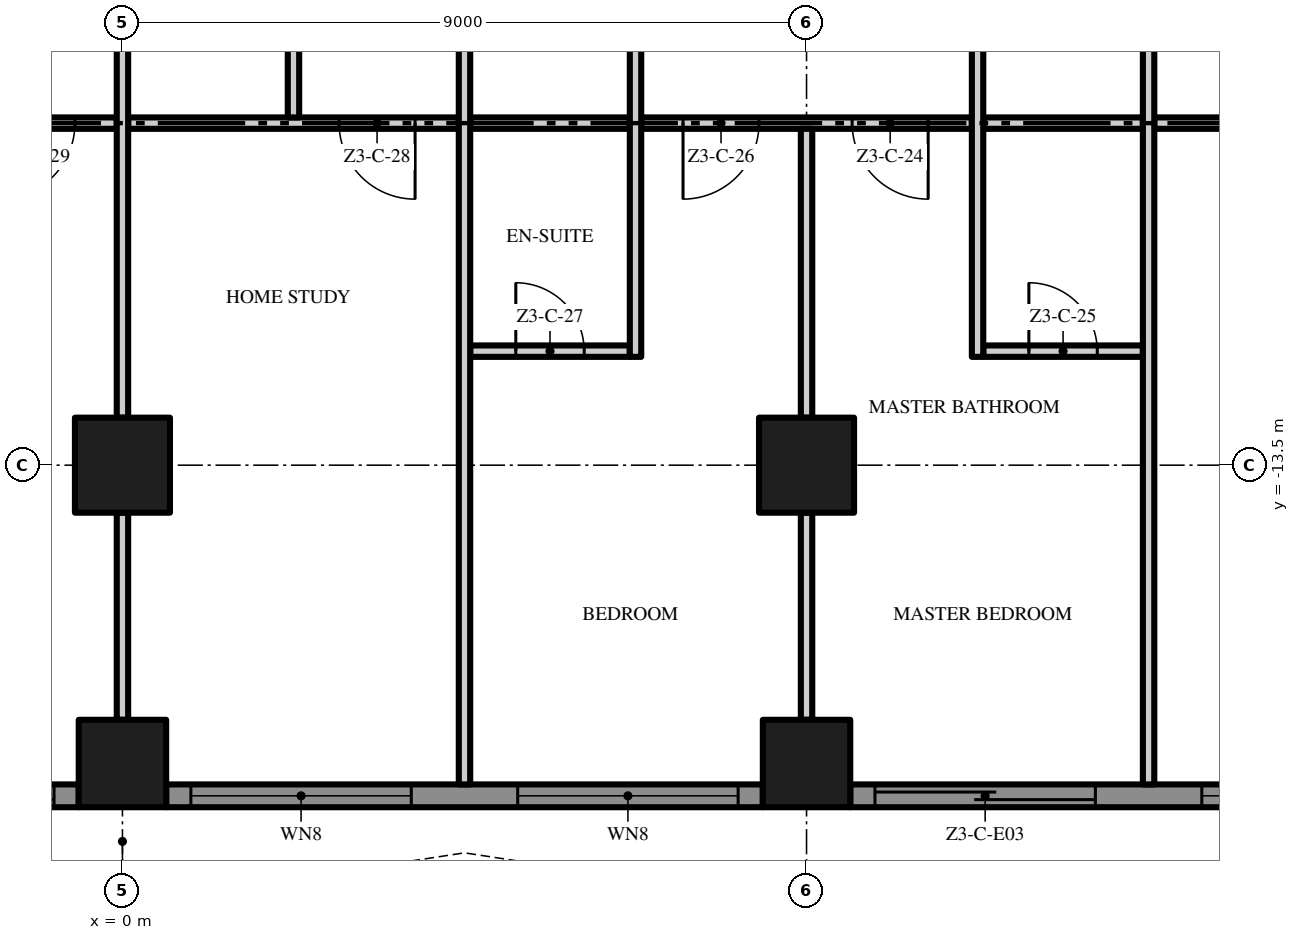
"""IFC4 building model, lengths in metres.
Left out: names, types, materials, properties, quantities, classifications, styles, units other than length and angle.
Written with IfcOpenShell. Run it as: python <this file> out.ifc"""

import sys

from ifc_helpers import new_model, si_unit, direction, frame, frame_2d, origin, origin_2d, place, context, subcontext, project, spatial, polyline, rectangle, outline, extrude, element, fill, save


model = new_model("IFC4")
c1 = context("Model", 3, precision=1e-05, world=origin(), true_north=direction((0.0, 1.0)))
c2 = subcontext(c1, "Body", "Model", "MODEL_VIEW")
j1 = project(units=[si_unit("LENGTHUNIT", "METRE"), si_unit("PLANEANGLEUNIT", "RADIAN")], contexts=[c1])
p1 = place(None, origin())
s1 = spatial("IfcSite", under=j1, at=p1, CompositionType="ELEMENT")
p2 = place(p1, origin())
s2 = spatial("IfcBuilding", under=s1, at=p2, CompositionType="ELEMENT")
p3 = place(p2, frame((0.0, 0.0, 151.6)))
s3 = spatial("IfcBuildingStorey", under=s2, at=p3, CompositionType="ELEMENT", Elevation=151.6)
p4 = place(p3, frame((0.0, -13.5, 0.0), z_axis=(0.0, 0.0, 1.0), x_axis=(1.0, 0.0, 0.0)))
e1 = element("IfcColumn", 1, at=p4, inside=s3, PredefinedType="COLUMN", context=c2, shape_type="SweptSolid", body=[
    extrude(rectangle(XDim=1.25, YDim=1.25, at=origin_2d()), origin(), (0.0, 0.0, 1.0), 3.5),
])
p5 = place(p3, frame((0.0, -17.425, 0.0), z_axis=(0.0, 0.0, 1.0), x_axis=(1.0, 0.0, 0.0)))
e2 = element("IfcColumn", 2, at=p5, inside=s3, PredefinedType="COLUMN", context=c2, shape_type="SweptSolid", body=[
    extrude(rectangle(XDim=1.15, YDim=1.15, at=origin_2d()), origin(), (0.0, 0.0, 1.0), 3.5),
])
p6 = place(p3, frame((9.0, -13.5, 0.0), z_axis=(0.0, 0.0, 1.0), x_axis=(1.0, 0.0, 0.0)))
e3 = element("IfcColumn", 3, at=p6, inside=s3, PredefinedType="COLUMN", context=c2, shape_type="SweptSolid", body=[
    extrude(rectangle(XDim=1.25, YDim=1.25, at=origin_2d()), origin(), (0.0, 0.0, 1.0), 3.5),
])
p7 = place(p3, frame((9.0, -17.425, 0.0), z_axis=(0.0, 0.0, 1.0), x_axis=(1.0, 0.0, 0.0)))
e4 = element("IfcColumn", 4, at=p7, inside=s3, PredefinedType="COLUMN", context=c2, shape_type="SweptSolid", body=[
    extrude(rectangle(XDim=1.15, YDim=1.15, at=origin_2d()), origin(), (0.0, 0.0, 1.0), 3.5),
])
p8 = place(p3, frame((-0.575, -17.85, 0.0), z_axis=(0.0, 0.0, 1.0), x_axis=(-1.0, 0.0, 0.0)))
e5 = element("IfcWall", 5, at=p8, inside=s3, PredefinedType="SOLIDWALL", context=c2, shape_type="SweptSolid", body=[
    extrude(rectangle(XDim=7.85, YDim=0.3, at=frame_2d((3.925, 0.0))), origin(), (0.0, 0.0, 1.0), 3.5),
])
p9 = place(p8, frame((4.625, 0.0, 0.45)))
e6 = element("IfcOpeningElement", 6, at=p9, cuts=e5, PredefinedType="OPENING", context=c2, shape_type="SweptSolid", body=[
    extrude(rectangle(XDim=2.9, YDim=2.65, at=frame_2d((1.45, 1.325))), frame((0.0, 0.16, 0.0), z_axis=(0.0, -1.0, 0.0), x_axis=(1.0, 0.0, 0.0)), (0.0, 0.0, 1.0), 0.32),
])
p10 = place(p8, frame((0.325, 0.0, 0.0)))
e7 = element("IfcOpeningElement", 7, at=p10, cuts=e5, PredefinedType="OPENING", context=c2, shape_type="SweptSolid", body=[
    extrude(rectangle(XDim=2.9, YDim=2.4, at=frame_2d((1.45, 1.2))), frame((0.0, 0.16, 0.0), z_axis=(0.0, -1.0, 0.0), x_axis=(1.0, 0.0, 0.0)), (0.0, 0.0, 1.0), 0.32),
])
p11 = place(p3, frame((8.425, -17.85, 0.0), z_axis=(0.0, 0.0, 1.0), x_axis=(-1.0, 0.0, 0.0)))
e8 = element("IfcWall", 8, at=p11, inside=s3, PredefinedType="SOLIDWALL", context=c2, shape_type="SweptSolid", body=[
    extrude(rectangle(XDim=7.85, YDim=0.3, at=frame_2d((3.925, 0.0))), origin(), (0.0, 0.0, 1.0), 3.5),
])
p12 = place(p11, frame((4.625, 0.0, 0.45)))
e9 = element("IfcOpeningElement", 9, at=p12, cuts=e8, PredefinedType="OPENING", context=c2, shape_type="SweptSolid", body=[
    extrude(rectangle(XDim=2.9, YDim=2.65, at=frame_2d((1.45, 1.325))), frame((0.0, 0.16, 0.0), z_axis=(0.0, -1.0, 0.0), x_axis=(1.0, 0.0, 0.0)), (0.0, 0.0, 1.0), 0.32),
])
p13 = place(p11, frame((0.325, 0.0, 0.45)))
e10 = element("IfcOpeningElement", 10, at=p13, cuts=e8, PredefinedType="OPENING", context=c2, shape_type="SweptSolid", body=[
    extrude(rectangle(XDim=2.9, YDim=2.65, at=frame_2d((1.45, 1.325))), frame((0.0, 0.16, 0.0), z_axis=(0.0, -1.0, 0.0), x_axis=(1.0, 0.0, 0.0)), (0.0, 0.0, 1.0), 0.32),
])
p14 = place(p3, frame((16.85, -17.85, 0.0), z_axis=(0.0, 0.0, 1.0), x_axis=(-1.0, 0.0, 0.0)))
e11 = element("IfcWall", 11, at=p14, inside=s3, PredefinedType="SOLIDWALL", context=c2, shape_type="SweptSolid", body=[
    extrude(rectangle(XDim=7.275, YDim=0.3, at=frame_2d((3.638, 0.0))), origin(), (0.0, 0.0, 1.0), 3.5),
])
p15 = place(p14, frame((4.05, 0.0, 0.0)))
e12 = element("IfcOpeningElement", 12, at=p15, cuts=e11, PredefinedType="OPENING", context=c2, shape_type="SweptSolid", body=[
    extrude(rectangle(XDim=2.9, YDim=2.4, at=frame_2d((1.45, 1.2))), frame((0.0, 0.16, 0.0), z_axis=(0.0, -1.0, 0.0), x_axis=(1.0, 0.0, 0.0)), (0.0, 0.0, 1.0), 0.32),
])
p16 = place(p14, frame((0.3, 0.0, 0.45)))
e13 = element("IfcOpeningElement", 13, at=p16, cuts=e11, PredefinedType="OPENING", context=c2, shape_type="SweptSolid", body=[
    extrude(rectangle(XDim=2.35, YDim=2.65, at=frame_2d((1.175, 1.325))), frame((0.0, 0.16, 0.0), z_axis=(0.0, -1.0, 0.0), x_axis=(1.0, 0.0, 0.0)), (0.0, 0.0, 1.0), 0.32),
])
p17 = place(p3, origin())
e14 = element("IfcWall", 14, at=p17, inside=s3, PredefinedType="USERDEFINED", context=c2, shape_type="SweptSolid", body=[
    extrude(outline(polyline([(-18.0, -21.0), (-16.5, -20.771), (-15.0, -20.171), (-13.5, -19.429), (-12.0, -18.829), (-10.5, -18.6), (-9.0, -18.829), (-7.5, -19.429), (-6.0, -20.171), (-4.5, -20.771), (-3.0, -21.0), (-1.5, -20.771), (0.0, -20.171), (1.5, -19.429), (3.0, -18.829), (4.5, -18.6), (6.0, -18.829), (7.5, -19.429), (9.0, -20.171), (10.5, -20.771), (12.0, -21.0), (13.5, -20.771), (15.0, -20.171), (16.5, -19.429), (18.0, -18.829), (17.907, -18.597), (16.398, -19.201), (14.898, -19.942), (13.434, -20.528), (12.0, -20.747), (10.566, -20.528), (9.102, -19.942), (7.602, -19.201), (6.066, -18.586), (4.5, -18.347), (2.934, -18.586), (1.398, -19.201), (-0.102, -19.942), (-1.566, -20.528), (-3.0, -20.747), (-4.434, -20.528), (-5.898, -19.942), (-7.398, -19.201), (-8.934, -18.586), (-10.5, -18.347), (-12.066, -18.586), (-13.602, -19.201), (-15.102, -19.942), (-16.566, -20.528), (-18.038, -20.753), (-18.0, -21.0)])), origin(), (0.0, 0.0, 1.0), 0.9),
])
p18 = place(p3, frame((4.575, -12.0, 0.0), z_axis=(0.0, 0.0, 1.0), x_axis=(1.0, 0.0, 0.0)))
e15 = element("IfcWall", 15, at=p18, inside=s3, PredefinedType="PARTITIONING", context=c2, shape_type="SweptSolid", body=[
    extrude(rectangle(XDim=2.1, YDim=0.15, at=frame_2d((1.05, 0.0))), origin(), (0.0, 0.0, 1.0), 3.5),
])
p19 = place(p18, frame((0.6, 0.0, 0.0)))
e16 = element("IfcOpeningElement", 16, at=p19, cuts=e15, PredefinedType="OPENING", context=c2, shape_type="SweptSolid", body=[
    extrude(rectangle(XDim=0.9, YDim=2.1, at=frame_2d((0.45, 1.05))), frame((0.0, 0.085, 0.0), z_axis=(0.0, -1.0, 0.0), x_axis=(1.0, 0.0, 0.0)), (0.0, 0.0, 1.0), 0.17),
])
p20 = place(p3, frame((11.325, -12.0, 0.0), z_axis=(0.0, 0.0, 1.0), x_axis=(1.0, 0.0, 0.0)))
e17 = element("IfcWall", 17, at=p20, inside=s3, PredefinedType="PARTITIONING", context=c2, shape_type="SweptSolid", body=[
    extrude(rectangle(XDim=2.1, YDim=0.15, at=frame_2d((1.05, 0.0))), origin(), (0.0, 0.0, 1.0), 3.5),
])
p21 = place(p20, frame((0.6, 0.0, 0.0)))
e18 = element("IfcOpeningElement", 18, at=p21, cuts=e17, PredefinedType="OPENING", context=c2, shape_type="SweptSolid", body=[
    extrude(rectangle(XDim=0.9, YDim=2.1, at=frame_2d((0.45, 1.05))), frame((0.0, 0.085, 0.0), z_axis=(0.0, -1.0, 0.0), x_axis=(1.0, 0.0, 0.0)), (0.0, 0.0, 1.0), 0.17),
])
p22 = place(p3, frame((-0.075, -9.0, 0.0), z_axis=(0.0, 0.0, 1.0), x_axis=(-1.0, 0.0, 0.0)))
e19 = element("IfcWall", 19, at=p22, inside=s3, PredefinedType="PARTITIONING", context=c2, shape_type="SweptSolid", body=[
    extrude(rectangle(XDim=2.1, YDim=0.15, at=frame_2d((1.05, 0.0))), origin(), (0.0, 0.0, 1.0), 3.5),
])
p23 = place(p22, frame((0.55, 0.0, 0.0)))
e20 = element("IfcOpeningElement", 20, at=p23, cuts=e19, PredefinedType="OPENING", context=c2, shape_type="SweptSolid", body=[
    extrude(rectangle(XDim=1.0, YDim=2.4, at=frame_2d((0.5, 1.2))), frame((0.0, 0.085, 0.0), z_axis=(0.0, -1.0, 0.0), x_axis=(1.0, 0.0, 0.0)), (0.0, 0.0, 1.0), 0.17),
])
p24 = place(p3, frame((4.425, -9.0, 0.0), z_axis=(0.0, 0.0, 1.0), x_axis=(-1.0, 0.0, 0.0)))
e21 = element("IfcWall", 21, at=p24, inside=s3, PredefinedType="PARTITIONING", context=c2, shape_type="SweptSolid", body=[
    extrude(rectangle(XDim=4.35, YDim=0.15, at=frame_2d((2.175, 0.0))), origin(), (0.0, 0.0, 1.0), 3.5),
])
p25 = place(p24, frame((0.575, 0.0, 0.0)))
e22 = element("IfcOpeningElement", 22, at=p25, cuts=e21, PredefinedType="OPENING", context=c2, shape_type="SweptSolid", body=[
    extrude(rectangle(XDim=1.0, YDim=2.4, at=frame_2d((0.5, 1.2))), frame((0.0, 0.085, 0.0), z_axis=(0.0, -1.0, 0.0), x_axis=(1.0, 0.0, 0.0)), (0.0, 0.0, 1.0), 0.17),
])
p26 = place(p3, frame((4.575, -9.0, 0.0), z_axis=(0.0, 0.0, 1.0), x_axis=(1.0, 0.0, 0.0)))
e23 = element("IfcWall", 23, at=p26, inside=s3, PredefinedType="PARTITIONING", context=c2, shape_type="SweptSolid", body=[
    extrude(rectangle(XDim=2.1, YDim=0.15, at=frame_2d((1.05, 0.0))), origin(), (0.0, 0.0, 1.0), 3.5),
])
p27 = place(p3, frame((11.175, -9.0, 0.0), z_axis=(0.0, 0.0, 1.0), x_axis=(-1.0, 0.0, 0.0)))
e24 = element("IfcWall", 24, at=p27, inside=s3, PredefinedType="PARTITIONING", context=c2, shape_type="SweptSolid", body=[
    extrude(rectangle(XDim=4.35, YDim=0.15, at=frame_2d((2.175, 0.0))), origin(), (0.0, 0.0, 1.0), 3.5),
])
p28 = place(p27, frame((0.575, 0.0, 0.0)))
e25 = element("IfcOpeningElement", 25, at=p28, cuts=e24, PredefinedType="OPENING", context=c2, shape_type="SweptSolid", body=[
    extrude(rectangle(XDim=1.0, YDim=2.4, at=frame_2d((0.5, 1.2))), frame((0.0, 0.085, 0.0), z_axis=(0.0, -1.0, 0.0), x_axis=(1.0, 0.0, 0.0)), (0.0, 0.0, 1.0), 0.17),
])
p29 = place(p27, frame((2.8, 0.0, 0.0)))
e26 = element("IfcOpeningElement", 26, at=p29, cuts=e24, PredefinedType="OPENING", context=c2, shape_type="SweptSolid", body=[
    extrude(rectangle(XDim=1.0, YDim=2.4, at=frame_2d((0.5, 1.2))), frame((0.0, 0.085, 0.0), z_axis=(0.0, -1.0, 0.0), x_axis=(1.0, 0.0, 0.0)), (0.0, 0.0, 1.0), 0.17),
])
p30 = place(p3, frame((11.325, -9.0, 0.0), z_axis=(0.0, 0.0, 1.0), x_axis=(1.0, 0.0, 0.0)))
e27 = element("IfcWall", 27, at=p30, inside=s3, PredefinedType="PARTITIONING", context=c2, shape_type="SweptSolid", body=[
    extrude(rectangle(XDim=2.1, YDim=0.15, at=frame_2d((1.05, 0.0))), origin(), (0.0, 0.0, 1.0), 3.5),
])
p31 = place(p3, frame((22.2, -9.0, 0.0), z_axis=(0.0, 0.0, 1.0), x_axis=(-1.0, 0.0, 0.0)))
e28 = element("IfcWall", 28, at=p31, inside=s3, PredefinedType="PARTITIONING", context=c2, shape_type="SweptSolid", body=[
    extrude(rectangle(XDim=8.625, YDim=0.15, at=frame_2d((4.312, 0.0))), origin(), (0.0, 0.0, 1.0), 3.5),
])
p32 = place(p31, frame((5.925, 0.0, 0.0)))
e29 = element("IfcOpeningElement", 29, at=p32, cuts=e28, PredefinedType="OPENING", context=c2, shape_type="SweptSolid", body=[
    extrude(rectangle(XDim=1.8, YDim=2.4, at=frame_2d((0.9, 1.2))), frame((0.0, 0.085, 0.0), z_axis=(0.0, -1.0, 0.0), x_axis=(1.0, 0.0, 0.0)), (0.0, 0.0, 1.0), 0.17),
])
p33 = place(p3, frame((0.0, -16.85, 0.0), z_axis=(0.0, 0.0, 1.0), x_axis=(0.0, 1.0, 0.0)))
e30 = element("IfcWall", 30, at=p33, inside=s3, PredefinedType="PARTITIONING", context=c2, shape_type="SweptSolid", body=[
    extrude(rectangle(XDim=2.725, YDim=0.15, at=frame_2d((1.363, 0.0))), origin(), (0.0, 0.0, 1.0), 3.5),
])
p34 = place(p3, frame((0.0, -12.875, 0.0), z_axis=(0.0, 0.0, 1.0), x_axis=(0.0, 1.0, 0.0)))
e31 = element("IfcWall", 31, at=p34, inside=s3, PredefinedType="PARTITIONING", context=c2, shape_type="SweptSolid", body=[
    extrude(rectangle(XDim=7.75, YDim=0.15, at=frame_2d((3.875, 0.0))), origin(), (0.0, 0.0, 1.0), 3.5),
])
p35 = place(p3, frame((2.25, -8.925, 0.0), z_axis=(0.0, 0.0, 1.0), x_axis=(0.0, 1.0, 0.0)))
e32 = element("IfcWall", 32, at=p35, inside=s3, PredefinedType="PARTITIONING", context=c2, shape_type="SweptSolid", body=[
    extrude(rectangle(XDim=4.5, YDim=0.15, at=frame_2d((2.25, 0.0))), origin(), (0.0, 0.0, 1.0), 3.5),
])
p36 = place(p3, frame((4.5, -17.7, 0.0), z_axis=(0.0, 0.0, 1.0), x_axis=(0.0, 1.0, 0.0)))
e33 = element("IfcWall", 33, at=p36, inside=s3, PredefinedType="PARTITIONING", context=c2, shape_type="SweptSolid", body=[
    extrude(rectangle(XDim=13.275, YDim=0.15, at=frame_2d((6.638, 0.0))), origin(), (0.0, 0.0, 1.0), 3.5),
])
p37 = place(p3, frame((6.75, -12.075, 0.0), z_axis=(0.0, 0.0, 1.0), x_axis=(0.0, 1.0, 0.0)))
e34 = element("IfcWall", 34, at=p37, inside=s3, PredefinedType="PARTITIONING", context=c2, shape_type="SweptSolid", body=[
    extrude(rectangle(XDim=7.65, YDim=0.15, at=frame_2d((3.825, 0.0))), origin(), (0.0, 0.0, 1.0), 3.5),
])
p38 = place(p3, frame((9.0, -16.85, 0.0), z_axis=(0.0, 0.0, 1.0), x_axis=(0.0, 1.0, 0.0)))
e35 = element("IfcWall", 35, at=p38, inside=s3, PredefinedType="PARTITIONING", context=c2, shape_type="SweptSolid", body=[
    extrude(rectangle(XDim=2.725, YDim=0.15, at=frame_2d((1.363, 0.0))), origin(), (0.0, 0.0, 1.0), 3.5),
])
p39 = place(p3, frame((9.0, -12.875, 0.0), z_axis=(0.0, 0.0, 1.0), x_axis=(0.0, 1.0, 0.0)))
e36 = element("IfcWall", 36, at=p39, inside=s3, PredefinedType="PARTITIONING", context=c2, shape_type="SweptSolid", body=[
    extrude(rectangle(XDim=3.8, YDim=0.15, at=frame_2d((1.9, 0.0))), origin(), (0.0, 0.0, 1.0), 3.5),
])
p40 = place(p3, frame((11.25, -12.075, 0.0), z_axis=(0.0, 0.0, 1.0), x_axis=(0.0, 1.0, 0.0)))
e37 = element("IfcWall", 37, at=p40, inside=s3, PredefinedType="PARTITIONING", context=c2, shape_type="SweptSolid", body=[
    extrude(rectangle(XDim=7.65, YDim=0.15, at=frame_2d((3.825, 0.0))), origin(), (0.0, 0.0, 1.0), 3.5),
])
p41 = place(p3, frame((13.5, -17.7, 0.0), z_axis=(0.0, 0.0, 1.0), x_axis=(0.0, 1.0, 0.0)))
e38 = element("IfcWall", 38, at=p41, inside=s3, PredefinedType="PARTITIONING", context=c2, shape_type="SweptSolid", body=[
    extrude(rectangle(XDim=13.275, YDim=0.15, at=frame_2d((6.638, 0.0))), origin(), (0.0, 0.0, 1.0), 3.5),
])
p42 = place(p41, frame((10.5, 0.0, 0.0)))
e39 = element("IfcOpeningElement", 39, at=p42, cuts=e38, PredefinedType="OPENING", context=c2, shape_type="SweptSolid", body=[
    extrude(rectangle(XDim=0.9, YDim=2.1, at=frame_2d((0.45, 1.05))), frame((0.0, 0.085, 0.0), z_axis=(0.0, -1.0, 0.0), x_axis=(1.0, 0.0, 0.0)), (0.0, 0.0, 1.0), 0.17),
])
p43 = place(p10, origin())
e40 = element("IfcDoor", 40, at=p43, inside=s3, OperationType="SINGLE_SWING_LEFT", PredefinedType="DOOR", context=c2, shape_type="SweptSolid", body=[
    extrude(rectangle(XDim=2.9, YDim=2.4, at=frame_2d((1.45, 1.2))), frame((0.0, 0.025, 0.0), z_axis=(0.0, -1.0, 0.0), x_axis=(1.0, 0.0, 0.0)), (0.0, 0.0, 1.0), 0.05),
])
fill(e7, e40)
p44 = place(p12, origin())
e41 = element("IfcWindow", 41, at=p44, inside=s3, PartitioningType="SINGLE_PANEL", PredefinedType="WINDOW", context=c2, shape_type="SweptSolid", body=[
    extrude(rectangle(XDim=2.9, YDim=2.65, at=frame_2d((1.45, 1.325))), frame((0.0, 0.03, 0.0), z_axis=(0.0, -1.0, 0.0), x_axis=(1.0, 0.0, 0.0)), (0.0, 0.0, 1.0), 0.06),
])
fill(e9, e41)
p45 = place(p13, origin())
e42 = element("IfcWindow", 42, at=p45, inside=s3, PartitioningType="SINGLE_PANEL", PredefinedType="WINDOW", context=c2, shape_type="SweptSolid", body=[
    extrude(rectangle(XDim=2.9, YDim=2.65, at=frame_2d((1.45, 1.325))), frame((0.0, 0.03, 0.0), z_axis=(0.0, -1.0, 0.0), x_axis=(1.0, 0.0, 0.0)), (0.0, 0.0, 1.0), 0.06),
])
fill(e10, e42)
p46 = place(p15, origin())
e43 = element("IfcDoor", 43, at=p46, inside=s3, OperationType="SINGLE_SWING_LEFT", PredefinedType="DOOR", context=c2, shape_type="SweptSolid", body=[
    extrude(rectangle(XDim=2.9, YDim=2.4, at=frame_2d((1.45, 1.2))), frame((0.0, 0.025, 0.0), z_axis=(0.0, -1.0, 0.0), x_axis=(1.0, 0.0, 0.0)), (0.0, 0.0, 1.0), 0.05),
])
fill(e12, e43)
p47 = place(p16, origin())
e44 = element("IfcWindow", 44, at=p47, inside=s3, PartitioningType="SINGLE_PANEL", PredefinedType="WINDOW", context=c2, shape_type="SweptSolid", body=[
    extrude(rectangle(XDim=2.35, YDim=2.65, at=frame_2d((1.175, 1.325))), frame((0.0, 0.03, 0.0), z_axis=(0.0, -1.0, 0.0), x_axis=(1.0, 0.0, 0.0)), (0.0, 0.0, 1.0), 0.06),
])
fill(e13, e44)
p48 = place(p28, origin())
e45 = element("IfcDoor", 45, at=p48, inside=s3, OperationType="SINGLE_SWING_LEFT", PredefinedType="DOOR", context=c2, shape_type="SweptSolid", body=[
    extrude(rectangle(XDim=1.0, YDim=2.4, at=frame_2d((0.5, 1.2))), frame((0.0, 0.025, 0.0), z_axis=(0.0, -1.0, 0.0), x_axis=(1.0, 0.0, 0.0)), (0.0, 0.0, 1.0), 0.05),
])
fill(e25, e45)
p49 = place(p21, origin())
e46 = element("IfcDoor", 46, at=p49, inside=s3, OperationType="SINGLE_SWING_LEFT", PredefinedType="DOOR", context=c2, shape_type="SweptSolid", body=[
    extrude(rectangle(XDim=0.9, YDim=2.1, at=frame_2d((0.45, 1.05))), frame((0.0, 0.025, 0.0), z_axis=(0.0, -1.0, 0.0), x_axis=(1.0, 0.0, 0.0)), (0.0, 0.0, 1.0), 0.05),
])
fill(e18, e46)
p50 = place(p29, origin())
e47 = element("IfcDoor", 47, at=p50, inside=s3, OperationType="SINGLE_SWING_RIGHT", PredefinedType="DOOR", context=c2, shape_type="SweptSolid", body=[
    extrude(rectangle(XDim=1.0, YDim=2.4, at=frame_2d((0.5, 1.2))), frame((0.0, 0.025, 0.0), z_axis=(0.0, -1.0, 0.0), x_axis=(1.0, 0.0, 0.0)), (0.0, 0.0, 1.0), 0.05),
])
fill(e26, e47)
p51 = place(p19, origin())
e48 = element("IfcDoor", 48, at=p51, inside=s3, OperationType="SINGLE_SWING_LEFT", PredefinedType="DOOR", context=c2, shape_type="SweptSolid", body=[
    extrude(rectangle(XDim=0.9, YDim=2.1, at=frame_2d((0.45, 1.05))), frame((0.0, 0.025, 0.0), z_axis=(0.0, -1.0, 0.0), x_axis=(1.0, 0.0, 0.0)), (0.0, 0.0, 1.0), 0.05),
])
fill(e16, e48)
p52 = place(p25, origin())
e49 = element("IfcDoor", 49, at=p52, inside=s3, OperationType="SINGLE_SWING_LEFT", PredefinedType="DOOR", context=c2, shape_type="SweptSolid", body=[
    extrude(rectangle(XDim=1.0, YDim=2.4, at=frame_2d((0.5, 1.2))), frame((0.0, 0.025, 0.0), z_axis=(0.0, -1.0, 0.0), x_axis=(1.0, 0.0, 0.0)), (0.0, 0.0, 1.0), 0.05),
])
fill(e22, e49)
p53 = place(p23, origin())
e50 = element("IfcDoor", 50, at=p53, inside=s3, OperationType="SINGLE_SWING_RIGHT", PredefinedType="DOOR", context=c2, shape_type="SweptSolid", body=[
    extrude(rectangle(XDim=1.0, YDim=2.4, at=frame_2d((0.5, 1.2))), frame((0.0, 0.025, 0.0), z_axis=(0.0, -1.0, 0.0), x_axis=(1.0, 0.0, 0.0)), (0.0, 0.0, 1.0), 0.05),
])
fill(e20, e50)
save(model, sys.argv[1])
